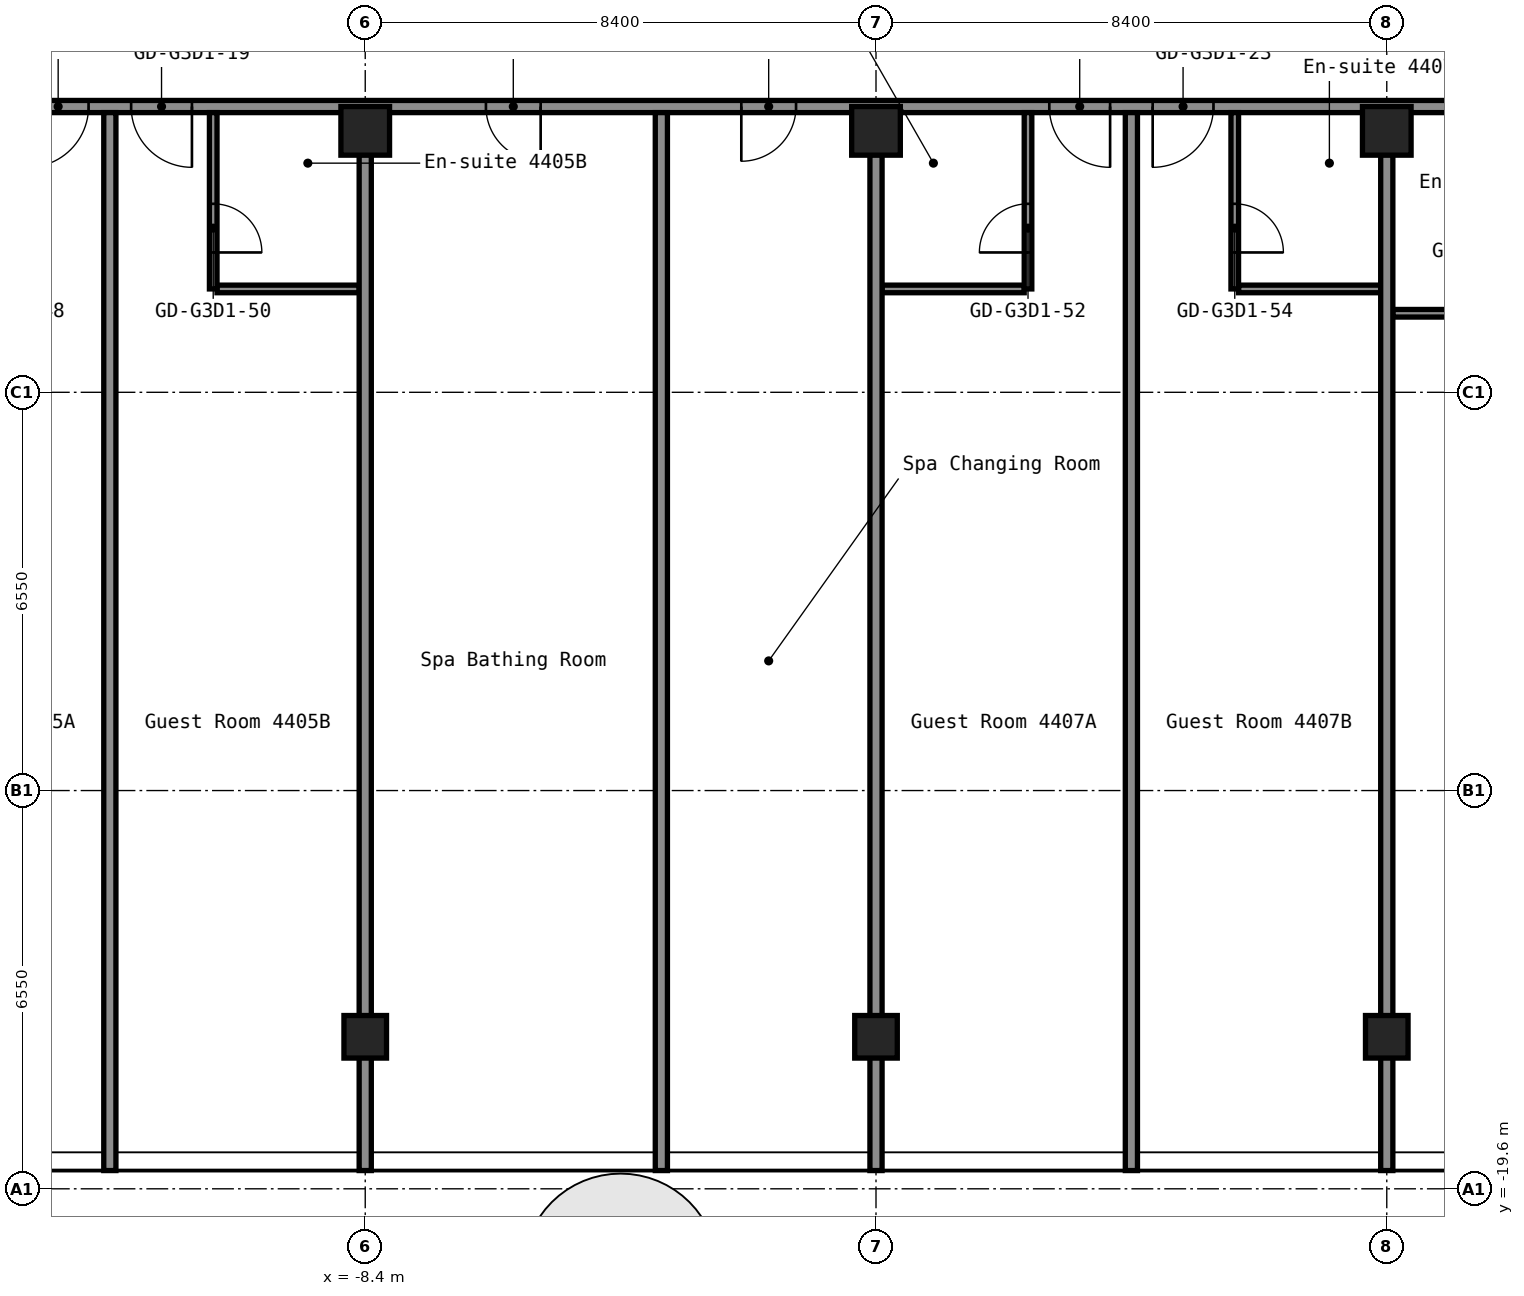
"""IFC4 building model, lengths in metres.
Left out: names, types, materials, properties, quantities, classifications, styles, units other than length and angle.
Written with IfcOpenShell. Run it as: python <this file> out.ifc"""

import sys

from ifc_helpers import new_model, si_unit, direction, frame, frame_2d, origin, origin_2d, place, context, subcontext, project, spatial, rectangle, hollow_rectangle, extrude, element, fill, save


model = new_model("IFC4")
c1 = context("Model", 3, precision=1e-05, world=origin(), true_north=direction((0.0, 1.0)))
c2 = subcontext(c1, "Body", "Model", "MODEL_VIEW")
j1 = project(units=[si_unit("LENGTHUNIT", "METRE"), si_unit("PLANEANGLEUNIT", "RADIAN")], contexts=[c1])
p1 = place(None, origin())
s1 = spatial("IfcSite", under=j1, at=p1, CompositionType="ELEMENT")
p2 = place(p1, origin())
s2 = spatial("IfcBuilding", under=s1, at=p2, CompositionType="ELEMENT")
p3 = place(p2, frame((0.0, 0.0, 156.6)))
s3 = spatial("IfcBuildingStorey", under=s2, at=p3, CompositionType="ELEMENT", Elevation=156.6)
p4 = place(p3, frame((-8.4, -17.1, 0.0), z_axis=(0.0, 0.0, 1.0), x_axis=(1.0, 0.0, 0.0)))
e1 = element("IfcColumn", 1, at=p4, inside=s3, PredefinedType="COLUMN", context=c2, shape_type="SweptSolid", body=[
    extrude(hollow_rectangle(XDim=0.7, YDim=0.7, WallThickness=0.028, at=origin_2d()), origin(), (0.0, 0.0, 1.0), 2.75),
])
p5 = place(p3, frame((-8.4, -2.2, 0.0), z_axis=(0.0, 0.0, 1.0), x_axis=(1.0, 0.0, 0.0)))
e2 = element("IfcColumn", 2, at=p5, inside=s3, PredefinedType="COLUMN", context=c2, shape_type="SweptSolid", body=[
    extrude(hollow_rectangle(XDim=0.8, YDim=0.8, WallThickness=0.032, at=origin_2d()), origin(), (0.0, 0.0, 1.0), 2.75),
])
p6 = place(p3, frame((0.0, -17.1, 0.0), z_axis=(0.0, 0.0, 1.0), x_axis=(1.0, 0.0, 0.0)))
e3 = element("IfcColumn", 3, at=p6, inside=s3, PredefinedType="COLUMN", context=c2, shape_type="SweptSolid", body=[
    extrude(hollow_rectangle(XDim=0.7, YDim=0.7, WallThickness=0.028, at=origin_2d()), origin(), (0.0, 0.0, 1.0), 2.75),
])
p7 = place(p3, frame((0.0, -2.2, 0.0), z_axis=(0.0, 0.0, 1.0), x_axis=(1.0, 0.0, 0.0)))
e4 = element("IfcColumn", 4, at=p7, inside=s3, PredefinedType="COLUMN", context=c2, shape_type="SweptSolid", body=[
    extrude(hollow_rectangle(XDim=0.8, YDim=0.8, WallThickness=0.032, at=origin_2d()), origin(), (0.0, 0.0, 1.0), 2.75),
])
p8 = place(p3, frame((8.4, -17.1, 0.0), z_axis=(0.0, 0.0, 1.0), x_axis=(1.0, 0.0, 0.0)))
e5 = element("IfcColumn", 5, at=p8, inside=s3, PredefinedType="COLUMN", context=c2, shape_type="SweptSolid", body=[
    extrude(hollow_rectangle(XDim=0.7, YDim=0.7, WallThickness=0.028, at=origin_2d()), origin(), (0.0, 0.0, 1.0), 2.75),
])
p9 = place(p3, frame((8.4, -2.2, 0.0), z_axis=(0.0, 0.0, 1.0), x_axis=(1.0, 0.0, 0.0)))
e6 = element("IfcColumn", 6, at=p9, inside=s3, PredefinedType="COLUMN", context=c2, shape_type="SweptSolid", body=[
    extrude(hollow_rectangle(XDim=0.8, YDim=0.8, WallThickness=0.032, at=origin_2d()), origin(), (0.0, 0.0, 1.0), 2.75),
])
p10 = place(p3, frame((8.5, -5.2, 0.0), z_axis=(0.0, 0.0, 1.0), x_axis=(1.0, 0.0, 0.0)))
e7 = element("IfcWall", 7, at=p10, inside=s3, PredefinedType="PARTITIONING", context=c2, shape_type="SweptSolid", body=[
    extrude(rectangle(XDim=3.238, YDim=0.125, at=frame_2d((1.619, 0.0))), origin(), (0.0, 0.0, 1.0), 2.75),
])
p11 = place(p10, frame((1.2, 0.0, 0.0)))
e8 = element("IfcOpeningElement", 8, at=p11, cuts=e7, PredefinedType="OPENING", context=c2, shape_type="SweptSolid", body=[
    extrude(rectangle(XDim=0.8, YDim=2.1, at=frame_2d((0.4, 1.05))), frame((0.0, 0.073, 0.0), z_axis=(0.0, -1.0, 0.0), x_axis=(1.0, 0.0, 0.0)), (0.0, 0.0, 1.0), 0.145),
])
for number, where, z_axis, x_axis in (
    (9, (-10.837, -4.8, 0.0), (0.0, 0.0, 1.0), (1.0, 0.0, 0.0)),
    (10, (0.1, -4.8, 0.0), (0.0, 0.0, 1.0), (1.0, 0.0, 0.0)),
):
    element("IfcWall", number, at=place(p3, frame(where, z_axis=z_axis, x_axis=x_axis)), inside=s3, PredefinedType="PARTITIONING", context=c2, shape_type="SweptSolid", body=[
        extrude(rectangle(XDim=2.337, YDim=0.125, at=frame_2d((1.169, 0.0))), origin(), (0.0, 0.0, 1.0), 2.75),
    ])
p12 = place(p3, frame((5.962, -4.8, 0.0), z_axis=(0.0, 0.0, 1.0), x_axis=(1.0, 0.0, 0.0)))
e11 = element("IfcWall", 11, at=p12, inside=s3, PredefinedType="PARTITIONING", context=c2, shape_type="SweptSolid", body=[
    extrude(rectangle(XDim=2.338, YDim=0.125, at=frame_2d((1.169, 0.0))), origin(), (0.0, 0.0, 1.0), 2.75),
])
p13 = place(p3, frame((-16.8, -1.8, 0.0), z_axis=(0.0, 0.0, 1.0), x_axis=(1.0, 0.0, 0.0)))
e12 = element("IfcWall", 12, at=p13, inside=s3, PredefinedType="PARTITIONING", context=c2, shape_type="SweptSolid", body=[
    extrude(rectangle(XDim=33.6, YDim=0.2, at=frame_2d((16.8, 0.0))), origin(), (0.0, 0.0, 1.0), 2.75),
])
p14 = place(p13, frame((2.85, 0.0, 0.0)))
e13 = element("IfcOpeningElement", 13, at=p14, cuts=e12, PredefinedType="OPENING", context=c2, shape_type="SweptSolid", body=[
    extrude(rectangle(XDim=1.0, YDim=2.1, at=frame_2d((0.5, 1.05))), frame((0.0, 0.11, 0.0), z_axis=(0.0, -1.0, 0.0), x_axis=(1.0, 0.0, 0.0)), (0.0, 0.0, 1.0), 0.22),
])
p15 = place(p13, frame((4.55, 0.0, 0.0)))
e14 = element("IfcOpeningElement", 14, at=p15, cuts=e12, PredefinedType="OPENING", context=c2, shape_type="SweptSolid", body=[
    extrude(rectangle(XDim=1.0, YDim=2.1, at=frame_2d((0.5, 1.05))), frame((0.0, 0.11, 0.0), z_axis=(0.0, -1.0, 0.0), x_axis=(1.0, 0.0, 0.0)), (0.0, 0.0, 1.0), 0.22),
])
p16 = place(p13, frame((10.385, 0.0, 0.0)))
e15 = element("IfcOpeningElement", 15, at=p16, cuts=e12, PredefinedType="OPENING", context=c2, shape_type="SweptSolid", body=[
    extrude(rectangle(XDim=0.9, YDim=2.1, at=frame_2d((0.45, 1.05))), frame((0.0, 0.11, 0.0), z_axis=(0.0, -1.0, 0.0), x_axis=(1.0, 0.0, 0.0)), (0.0, 0.0, 1.0), 0.22),
])
p17 = place(p13, frame((14.585, 0.0, 0.0)))
e16 = element("IfcOpeningElement", 16, at=p17, cuts=e12, PredefinedType="OPENING", context=c2, shape_type="SweptSolid", body=[
    extrude(rectangle(XDim=0.9, YDim=2.1, at=frame_2d((0.45, 1.05))), frame((0.0, 0.11, 0.0), z_axis=(0.0, -1.0, 0.0), x_axis=(1.0, 0.0, 0.0)), (0.0, 0.0, 1.0), 0.22),
])
p18 = place(p13, frame((19.65, 0.0, 0.0)))
e17 = element("IfcOpeningElement", 17, at=p18, cuts=e12, PredefinedType="OPENING", context=c2, shape_type="SweptSolid", body=[
    extrude(rectangle(XDim=1.0, YDim=2.1, at=frame_2d((0.5, 1.05))), frame((0.0, 0.11, 0.0), z_axis=(0.0, -1.0, 0.0), x_axis=(1.0, 0.0, 0.0)), (0.0, 0.0, 1.0), 0.22),
])
p19 = place(p13, frame((21.35, 0.0, 0.0)))
e18 = element("IfcOpeningElement", 18, at=p19, cuts=e12, PredefinedType="OPENING", context=c2, shape_type="SweptSolid", body=[
    extrude(rectangle(XDim=1.0, YDim=2.1, at=frame_2d((0.5, 1.05))), frame((0.0, 0.11, 0.0), z_axis=(0.0, -1.0, 0.0), x_axis=(1.0, 0.0, 0.0)), (0.0, 0.0, 1.0), 0.22),
])
p20 = place(p13, frame((30.6, 0.0, 0.0)))
e19 = element("IfcOpeningElement", 19, at=p20, cuts=e12, PredefinedType="OPENING", context=c2, shape_type="SweptSolid", body=[
    extrude(rectangle(XDim=1.0, YDim=2.1, at=frame_2d((0.5, 1.05))), frame((0.0, 0.11, 0.0), z_axis=(0.0, -1.0, 0.0), x_axis=(1.0, 0.0, 0.0)), (0.0, 0.0, 1.0), 0.22),
])
p21 = place(p3, frame((-12.6, -19.3, 0.0), z_axis=(0.0, 0.0, 1.0), x_axis=(0.0, 1.0, 0.0)))
e20 = element("IfcWall", 20, at=p21, inside=s3, PredefinedType="PARTITIONING", context=c2, shape_type="SweptSolid", body=[
    extrude(rectangle(XDim=17.4, YDim=0.2, at=frame_2d((8.7, 0.0))), origin(), (0.0, 0.0, 1.0), 2.75),
])
p22 = place(p3, frame((-10.9, -4.8, 0.0), z_axis=(0.0, 0.0, 1.0), x_axis=(0.0, 1.0, 0.0)))
e21 = element("IfcWall", 21, at=p22, inside=s3, PredefinedType="PARTITIONING", context=c2, shape_type="SweptSolid", body=[
    extrude(rectangle(XDim=2.9, YDim=0.125, at=frame_2d((1.45, 0.0))), origin(), (0.0, 0.0, 1.0), 2.75),
])
p23 = place(p22, frame((0.6, 0.0, 0.0)))
e22 = element("IfcOpeningElement", 22, at=p23, cuts=e21, PredefinedType="OPENING", context=c2, shape_type="SweptSolid", body=[
    extrude(rectangle(XDim=0.8, YDim=2.1, at=frame_2d((0.4, 1.05))), frame((0.0, 0.073, 0.0), z_axis=(0.0, -1.0, 0.0), x_axis=(1.0, 0.0, 0.0)), (0.0, 0.0, 1.0), 0.145),
])
p24 = place(p3, frame((-8.4, -19.3, 0.0), z_axis=(0.0, 0.0, 1.0), x_axis=(0.0, 1.0, 0.0)))
e23 = element("IfcWall", 23, at=p24, inside=s3, PredefinedType="PARTITIONING", context=c2, shape_type="SweptSolid", body=[
    extrude(rectangle(XDim=16.71, YDim=0.2, at=frame_2d((8.355, 0.0))), origin(), (0.0, 0.0, 1.0), 2.75),
])
p25 = place(p3, frame((-3.53, -19.3, 0.0), z_axis=(0.0, 0.0, 1.0), x_axis=(0.0, 1.0, 0.0)))
e24 = element("IfcWall", 24, at=p25, inside=s3, PredefinedType="PARTITIONING", context=c2, shape_type="SweptSolid", body=[
    extrude(rectangle(XDim=17.4, YDim=0.2, at=frame_2d((8.7, 0.0))), origin(), (0.0, 0.0, 1.0), 2.75),
])
p26 = place(p3, frame((0.0, -19.3, 0.0), z_axis=(0.0, 0.0, 1.0), x_axis=(0.0, 1.0, 0.0)))
e25 = element("IfcWall", 25, at=p26, inside=s3, PredefinedType="PARTITIONING", context=c2, shape_type="SweptSolid", body=[
    extrude(rectangle(XDim=16.71, YDim=0.2, at=frame_2d((8.355, 0.0))), origin(), (0.0, 0.0, 1.0), 2.75),
])
p27 = place(p3, frame((2.5, -4.8, 0.0), z_axis=(0.0, 0.0, 1.0), x_axis=(0.0, 1.0, 0.0)))
e26 = element("IfcWall", 26, at=p27, inside=s3, PredefinedType="PARTITIONING", context=c2, shape_type="SweptSolid", body=[
    extrude(rectangle(XDim=2.9, YDim=0.125, at=frame_2d((1.45, 0.0))), origin(), (0.0, 0.0, 1.0), 2.75),
])
p28 = place(p27, frame((0.6, 0.0, 0.0)))
e27 = element("IfcOpeningElement", 27, at=p28, cuts=e26, PredefinedType="OPENING", context=c2, shape_type="SweptSolid", body=[
    extrude(rectangle(XDim=0.8, YDim=2.1, at=frame_2d((0.4, 1.05))), frame((0.0, 0.073, 0.0), z_axis=(0.0, -1.0, 0.0), x_axis=(1.0, 0.0, 0.0)), (0.0, 0.0, 1.0), 0.145),
])
p29 = place(p3, frame((4.2, -19.3, 0.0), z_axis=(0.0, 0.0, 1.0), x_axis=(0.0, 1.0, 0.0)))
e28 = element("IfcWall", 28, at=p29, inside=s3, PredefinedType="PARTITIONING", context=c2, shape_type="SweptSolid", body=[
    extrude(rectangle(XDim=17.4, YDim=0.2, at=frame_2d((8.7, 0.0))), origin(), (0.0, 0.0, 1.0), 2.75),
])
p30 = place(p3, frame((5.9, -4.8, 0.0), z_axis=(0.0, 0.0, 1.0), x_axis=(0.0, 1.0, 0.0)))
e29 = element("IfcWall", 29, at=p30, inside=s3, PredefinedType="PARTITIONING", context=c2, shape_type="SweptSolid", body=[
    extrude(rectangle(XDim=2.9, YDim=0.125, at=frame_2d((1.45, 0.0))), origin(), (0.0, 0.0, 1.0), 2.75),
])
p31 = place(p30, frame((0.6, 0.0, 0.0)))
e30 = element("IfcOpeningElement", 30, at=p31, cuts=e29, PredefinedType="OPENING", context=c2, shape_type="SweptSolid", body=[
    extrude(rectangle(XDim=0.8, YDim=2.1, at=frame_2d((0.4, 1.05))), frame((0.0, 0.073, 0.0), z_axis=(0.0, -1.0, 0.0), x_axis=(1.0, 0.0, 0.0)), (0.0, 0.0, 1.0), 0.145),
])
p32 = place(p3, frame((8.4, -19.3, 0.0), z_axis=(0.0, 0.0, 1.0), x_axis=(0.0, 1.0, 0.0)))
e31 = element("IfcWall", 31, at=p32, inside=s3, PredefinedType="PARTITIONING", context=c2, shape_type="SweptSolid", body=[
    extrude(rectangle(XDim=16.71, YDim=0.2, at=frame_2d((8.355, 0.0))), origin(), (0.0, 0.0, 1.0), 2.75),
])
p33 = place(p14, origin())
e32 = element("IfcDoor", 32, at=p33, inside=s3, OperationType="SINGLE_SWING_LEFT", PredefinedType="DOOR", context=c2, shape_type="SweptSolid", body=[
    extrude(rectangle(XDim=1.0, YDim=2.1, at=frame_2d((0.5, 1.05))), frame((0.0, 0.025, 0.0), z_axis=(0.0, -1.0, 0.0), x_axis=(1.0, 0.0, 0.0)), (0.0, 0.0, 1.0), 0.05),
])
fill(e13, e32)
p34 = place(p15, origin())
e33 = element("IfcDoor", 33, at=p34, inside=s3, OperationType="SINGLE_SWING_RIGHT", PredefinedType="DOOR", context=c2, shape_type="SweptSolid", body=[
    extrude(rectangle(XDim=1.0, YDim=2.1, at=frame_2d((0.5, 1.05))), frame((0.0, 0.025, 0.0), z_axis=(0.0, -1.0, 0.0), x_axis=(1.0, 0.0, 0.0)), (0.0, 0.0, 1.0), 0.05),
])
fill(e14, e33)
p35 = place(p16, origin())
e34 = element("IfcDoor", 34, at=p35, inside=s3, OperationType="SINGLE_SWING_RIGHT", PredefinedType="DOOR", context=c2, shape_type="SweptSolid", body=[
    extrude(rectangle(XDim=0.9, YDim=2.1, at=frame_2d((0.45, 1.05))), frame((0.0, 0.025, 0.0), z_axis=(0.0, -1.0, 0.0), x_axis=(1.0, 0.0, 0.0)), (0.0, 0.0, 1.0), 0.05),
])
fill(e15, e34)
p36 = place(p17, origin())
e35 = element("IfcDoor", 35, at=p36, inside=s3, OperationType="SINGLE_SWING_LEFT", PredefinedType="DOOR", context=c2, shape_type="SweptSolid", body=[
    extrude(rectangle(XDim=0.9, YDim=2.1, at=frame_2d((0.45, 1.05))), frame((0.0, 0.025, 0.0), z_axis=(0.0, -1.0, 0.0), x_axis=(1.0, 0.0, 0.0)), (0.0, 0.0, 1.0), 0.05),
])
fill(e16, e35)
p37 = place(p18, origin())
e36 = element("IfcDoor", 36, at=p37, inside=s3, OperationType="SINGLE_SWING_RIGHT", PredefinedType="DOOR", context=c2, shape_type="SweptSolid", body=[
    extrude(rectangle(XDim=1.0, YDim=2.1, at=frame_2d((0.5, 1.05))), frame((0.0, 0.025, 0.0), z_axis=(0.0, -1.0, 0.0), x_axis=(1.0, 0.0, 0.0)), (0.0, 0.0, 1.0), 0.05),
])
fill(e17, e36)
p38 = place(p19, origin())
e37 = element("IfcDoor", 37, at=p38, inside=s3, OperationType="SINGLE_SWING_LEFT", PredefinedType="DOOR", context=c2, shape_type="SweptSolid", body=[
    extrude(rectangle(XDim=1.0, YDim=2.1, at=frame_2d((0.5, 1.05))), frame((0.0, 0.025, 0.0), z_axis=(0.0, -1.0, 0.0), x_axis=(1.0, 0.0, 0.0)), (0.0, 0.0, 1.0), 0.05),
])
fill(e18, e37)
p39 = place(p23, origin())
e38 = element("IfcDoor", 38, at=p39, inside=s3, OperationType="SINGLE_SWING_LEFT", PredefinedType="DOOR", context=c2, shape_type="SweptSolid", body=[
    extrude(rectangle(XDim=0.8, YDim=2.1, at=frame_2d((0.4, 1.05))), frame((0.0, 0.025, 0.0), z_axis=(0.0, -1.0, 0.0), x_axis=(1.0, 0.0, 0.0)), (0.0, 0.0, 1.0), 0.05),
])
fill(e22, e38)
p40 = place(p28, origin())
e39 = element("IfcDoor", 39, at=p40, inside=s3, OperationType="SINGLE_SWING_RIGHT", PredefinedType="DOOR", context=c2, shape_type="SweptSolid", body=[
    extrude(rectangle(XDim=0.8, YDim=2.1, at=frame_2d((0.4, 1.05))), frame((0.0, 0.025, 0.0), z_axis=(0.0, -1.0, 0.0), x_axis=(1.0, 0.0, 0.0)), (0.0, 0.0, 1.0), 0.05),
])
fill(e27, e39)
p41 = place(p31, origin())
e40 = element("IfcDoor", 40, at=p41, inside=s3, OperationType="SINGLE_SWING_LEFT", PredefinedType="DOOR", context=c2, shape_type="SweptSolid", body=[
    extrude(rectangle(XDim=0.8, YDim=2.1, at=frame_2d((0.4, 1.05))), frame((0.0, 0.025, 0.0), z_axis=(0.0, -1.0, 0.0), x_axis=(1.0, 0.0, 0.0)), (0.0, 0.0, 1.0), 0.05),
])
fill(e30, e40)
save(model, sys.argv[1])
